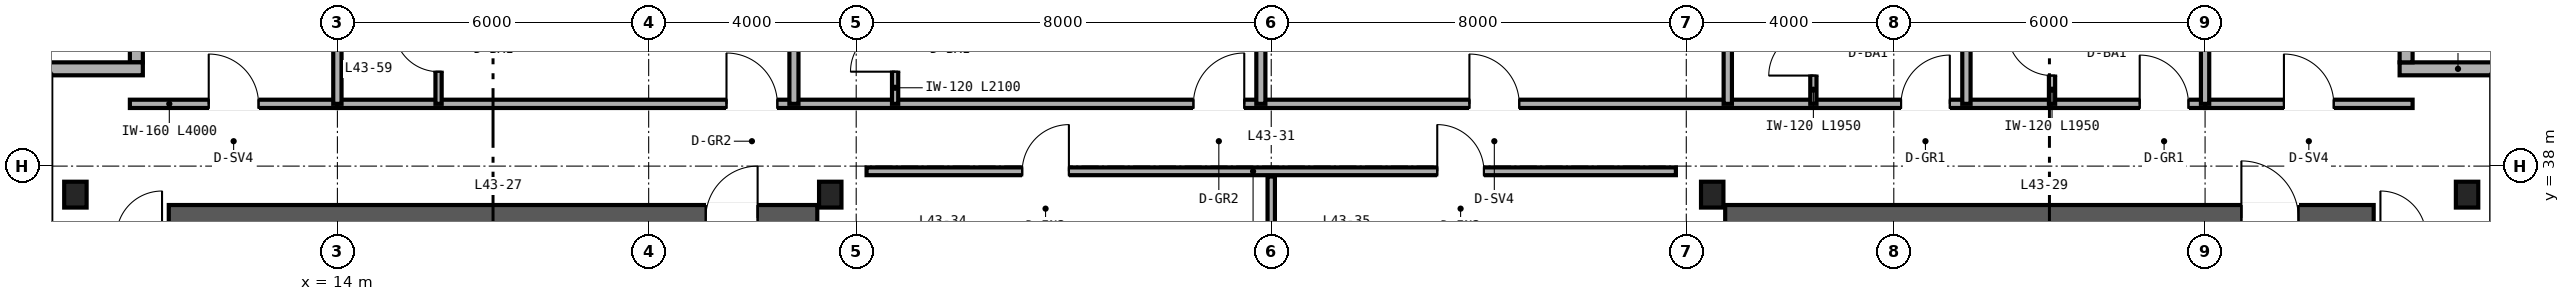
"""IFC4 building model, lengths in metres.
Left out: names, types, materials, properties, quantities, classifications, styles, units other than length and angle.
Written with IfcOpenShell. Run it as: python <this file> out.ifc"""

import sys

from ifc_helpers import new_model, si_unit, direction, frame, frame_2d, origin, origin_2d, place, context, subcontext, project, spatial, rectangle, i_section, extrude, source, transform, mapped, element, fill, save


model = new_model("IFC4")
c1 = context("Model", 3, precision=1e-05, world=origin(), true_north=direction((0.0, 1.0)))
c2 = subcontext(c1, "Body", "Model", "MODEL_VIEW")
j1 = project(units=[si_unit("LENGTHUNIT", "METRE"), si_unit("PLANEANGLEUNIT", "RADIAN")], contexts=[c1])
p1 = place(None, origin())
s1 = spatial("IfcSite", under=j1, at=p1, CompositionType="ELEMENT")
p2 = place(p1, origin())
s2 = spatial("IfcBuilding", under=s1, at=p2, CompositionType="ELEMENT")
p3 = place(p2, frame((0.0, 0.0, 174.0)))
s3 = spatial("IfcBuildingStorey", under=s2, at=p3, CompositionType="ELEMENT", Elevation=174.0)
p4 = place(p3, frame((10.75, 37.0, 0.0), z_axis=(0.0, 0.0, 1.0), x_axis=(1.0, 0.0, 0.0)))
e1 = element("IfcWall", 1, at=p4, inside=s3, PredefinedType="SHEAR", context=c2, shape_type="SweptSolid", body=[
    extrude(rectangle(XDim=12.5, YDim=0.5, at=frame_2d((6.25, 0.0))), origin(), (0.0, 0.0, 1.0), 3.37),
])
p5 = place(p4, frame((10.35, 0.0, 0.0)))
e2 = element("IfcOpeningElement", 2, at=p5, cuts=e1, PredefinedType="OPENING", context=c2, shape_type="SweptSolid", body=[
    extrude(rectangle(XDim=1.0, YDim=2.15, at=frame_2d((0.5, 1.075))), frame((0.0, 0.26, 0.0), z_axis=(0.0, -1.0, 0.0), x_axis=(1.0, 0.0, 0.0)), (0.0, 0.0, 1.0), 0.52),
])
p6 = place(p3, frame((40.75, 37.0, 0.0), z_axis=(0.0, 0.0, 1.0), x_axis=(1.0, 0.0, 0.0)))
e3 = element("IfcWall", 3, at=p6, inside=s3, PredefinedType="SHEAR", context=c2, shape_type="SweptSolid", body=[
    extrude(rectangle(XDim=12.5, YDim=0.5, at=frame_2d((6.25, 0.0))), origin(), (0.0, 0.0, 1.0), 3.37),
])
p7 = place(p6, frame((9.95, 0.0, 0.0)))
e4 = element("IfcOpeningElement", 4, at=p7, cuts=e3, PredefinedType="OPENING", context=c2, shape_type="SweptSolid", body=[
    extrude(rectangle(XDim=1.1, YDim=2.15, at=frame_2d((0.55, 1.075))), frame((0.0, 0.26, 0.0), z_axis=(0.0, -1.0, 0.0), x_axis=(1.0, 0.0, 0.0)), (0.0, 0.0, 1.0), 0.52),
])
m1 = source(origin(), c2, "Body", "SweptSolid", [
    extrude(i_section(OverallWidth=0.432, OverallDepth=0.498, WebThickness=0.056, FlangeThickness=0.089, FilletRadius=0.025, at=origin_2d()), origin(), (0.0, 0.0, 1.0), 3.37),
])
for number, where, z_axis, x_axis in (
    (5, (8.95, 37.45, 0.0), (0.0, 0.0, 1.0), (1.0, 0.0, 0.0)),
    (6, (23.5, 37.45, 0.0), (0.0, 0.0, 1.0), (1.0, 0.0, 0.0)),
    (7, (40.5, 37.45, 0.0), (0.0, 0.0, 1.0), (1.0, 0.0, 0.0)),
    (8, (55.05, 37.45, 0.0), (0.0, 0.0, 1.0), (1.0, 0.0, 0.0)),
):
    element("IfcColumn", number, at=place(p3, frame(where, z_axis=z_axis, x_axis=x_axis)), inside=s3, PredefinedType="COLUMN", context=c2, shape_type="MappedRepresentation", body=[
        mapped(m1, transform((0.0, 0.0, 0.0), scale=1.0)),
    ])
p8 = place(p3, frame((56.0, 39.875, 0.0), z_axis=(0.0, 0.0, 1.0), x_axis=(-1.0, 0.0, 0.0)))
e9 = element("IfcWall", 9, at=p8, inside=s3, PredefinedType="SOLIDWALL", context=c2, shape_type="SweptSolid", body=[
    extrude(rectangle(XDim=2.25, YDim=0.25, at=frame_2d((1.125, 0.0))), origin(), (0.0, 0.0, 1.0), 3.37),
])
for number, where, z_axis, x_axis in (
    (10, (53.875, 40.0, 0.0), (0.0, 0.0, 1.0), (0.0, 1.0, 0.0)),
    (11, (10.125, 42.0, 0.0), (0.0, 0.0, 1.0), (0.0, -1.0, 0.0)),
):
    element("IfcWall", number, at=place(p3, frame(where, z_axis=z_axis, x_axis=x_axis)), inside=s3, PredefinedType="SOLIDWALL", context=c2, shape_type="SweptSolid", body=[
        extrude(rectangle(XDim=2.0, YDim=0.25, at=frame_2d((1.0, 0.0))), origin(), (0.0, 0.0, 1.0), 3.37),
    ])
p9 = place(p3, frame((10.25, 39.875, 0.0), z_axis=(0.0, 0.0, 1.0), x_axis=(-1.0, 0.0, 0.0)))
e12 = element("IfcWall", 12, at=p9, inside=s3, PredefinedType="SOLIDWALL", context=c2, shape_type="SweptSolid", body=[
    extrude(rectangle(XDim=2.25, YDim=0.25, at=frame_2d((1.125, 0.0))), origin(), (0.0, 0.0, 1.0), 3.37),
])
p10 = place(p3, frame((24.2, 37.9, 0.0), z_axis=(0.0, 0.0, 1.0), x_axis=(1.0, 0.0, 0.0)))
e13 = element("IfcWall", 13, at=p10, inside=s3, PredefinedType="PARTITIONING", context=c2, shape_type="SweptSolid", body=[
    extrude(rectangle(XDim=15.6, YDim=0.15, at=frame_2d((7.8, 0.0))), origin(), (0.0, 0.0, 1.0), 3.37),
])
p11 = place(p10, frame((3.0, 0.0, 0.0)))
e14 = element("IfcOpeningElement", 14, at=p11, cuts=e13, PredefinedType="OPENING", context=c2, shape_type="SweptSolid", body=[
    extrude(rectangle(XDim=0.9, YDim=2.15, at=frame_2d((0.45, 1.075))), frame((0.0, 0.085, 0.0), z_axis=(0.0, -1.0, 0.0), x_axis=(1.0, 0.0, 0.0)), (0.0, 0.0, 1.0), 0.17),
])
p12 = place(p10, frame((11.0, 0.0, 0.0)))
e15 = element("IfcOpeningElement", 15, at=p12, cuts=e13, PredefinedType="OPENING", context=c2, shape_type="SweptSolid", body=[
    extrude(rectangle(XDim=0.9, YDim=2.15, at=frame_2d((0.45, 1.075))), frame((0.0, 0.085, 0.0), z_axis=(0.0, -1.0, 0.0), x_axis=(1.0, 0.0, 0.0)), (0.0, 0.0, 1.0), 0.17),
])
p13 = place(p3, frame((32.0, 36.12, 0.0), z_axis=(0.0, 0.0, 1.0), x_axis=(0.0, 1.0, 0.0)))
e16 = element("IfcWall", 16, at=p13, inside=s3, PredefinedType="PARTITIONING", context=c2, shape_type="SweptSolid", body=[
    extrude(rectangle(XDim=1.68, YDim=0.142, at=frame_2d((0.84, 0.0))), origin(), (0.0, 0.0, 1.0), 3.37),
])
p14 = place(p3, frame((10.0, 39.2, 0.0), z_axis=(0.0, 0.0, 1.0), x_axis=(1.0, 0.0, 0.0)))
e17 = element("IfcWall", 17, at=p14, inside=s3, PredefinedType="PARTITIONING", context=c2, shape_type="SweptSolid", body=[
    extrude(rectangle(XDim=4.0, YDim=0.16, at=frame_2d((2.0, 0.0))), origin(), (0.0, 0.0, 1.0), 3.37),
])
p15 = place(p14, frame((1.52, 0.0, 0.0)))
e18 = element("IfcOpeningElement", 18, at=p15, cuts=e17, PredefinedType="OPENING", context=c2, shape_type="SweptSolid", body=[
    extrude(rectangle(XDim=0.96, YDim=2.15, at=frame_2d((0.48, 1.075))), frame((0.0, 0.09, 0.0), z_axis=(0.0, -1.0, 0.0), x_axis=(1.0, 0.0, 0.0)), (0.0, 0.0, 1.0), 0.18),
])
p16 = place(p3, frame((50.0, 39.2, 0.0), z_axis=(0.0, 0.0, 1.0), x_axis=(1.0, 0.0, 0.0)))
e19 = element("IfcWall", 19, at=p16, inside=s3, PredefinedType="PARTITIONING", context=c2, shape_type="SweptSolid", body=[
    extrude(rectangle(XDim=4.0, YDim=0.16, at=frame_2d((2.0, 0.0))), origin(), (0.0, 0.0, 1.0), 3.37),
])
p17 = place(p16, frame((1.52, 0.0, 0.0)))
e20 = element("IfcOpeningElement", 20, at=p17, cuts=e19, PredefinedType="OPENING", context=c2, shape_type="SweptSolid", body=[
    extrude(rectangle(XDim=0.96, YDim=2.15, at=frame_2d((0.48, 1.075))), frame((0.0, 0.09, 0.0), z_axis=(0.0, -1.0, 0.0), x_axis=(1.0, 0.0, 0.0)), (0.0, 0.0, 1.0), 0.18),
])
p18 = place(p3, frame((14.0, 39.2, 0.0), z_axis=(0.0, 0.0, 1.0), x_axis=(1.0, 0.0, 0.0)))
e21 = element("IfcWall", 21, at=p18, inside=s3, PredefinedType="PARTITIONING", context=c2, shape_type="SweptSolid", body=[
    extrude(rectangle(XDim=36.0, YDim=0.16, at=frame_2d((18.0, 0.0))), origin(), (0.0, 0.0, 1.0), 2.913),
])
p19 = place(p18, frame((7.5, 0.0, 0.0)))
e22 = element("IfcOpeningElement", 22, at=p19, cuts=e21, PredefinedType="OPENING", context=c2, shape_type="SweptSolid", body=[
    extrude(rectangle(XDim=0.98, YDim=2.2, at=frame_2d((0.49, 1.1))), frame((0.0, 0.09, 0.0), z_axis=(0.0, -1.0, 0.0), x_axis=(1.0, 0.0, 0.0)), (0.0, 0.0, 1.0), 0.18),
])
p20 = place(p18, frame((16.5, 0.0, 0.0)))
e23 = element("IfcOpeningElement", 23, at=p20, cuts=e21, PredefinedType="OPENING", context=c2, shape_type="SweptSolid", body=[
    extrude(rectangle(XDim=0.98, YDim=2.2, at=frame_2d((0.49, 1.1))), frame((0.0, 0.09, 0.0), z_axis=(0.0, -1.0, 0.0), x_axis=(1.0, 0.0, 0.0)), (0.0, 0.0, 1.0), 0.18),
])
p21 = place(p18, frame((21.82, 0.0, 0.0)))
e24 = element("IfcOpeningElement", 24, at=p21, cuts=e21, PredefinedType="OPENING", context=c2, shape_type="SweptSolid", body=[
    extrude(rectangle(XDim=0.96, YDim=2.15, at=frame_2d((0.48, 1.075))), frame((0.0, 0.09, 0.0), z_axis=(0.0, -1.0, 0.0), x_axis=(1.0, 0.0, 0.0)), (0.0, 0.0, 1.0), 0.18),
])
p22 = place(p18, frame((30.14, 0.0, 0.0)))
e25 = element("IfcOpeningElement", 25, at=p22, cuts=e21, PredefinedType="OPENING", context=c2, shape_type="SweptSolid", body=[
    extrude(rectangle(XDim=0.94, YDim=2.15, at=frame_2d((0.47, 1.075))), frame((0.0, 0.09, 0.0), z_axis=(0.0, -1.0, 0.0), x_axis=(1.0, 0.0, 0.0)), (0.0, 0.0, 1.0), 0.18),
])
p23 = place(p18, frame((34.74, 0.0, 0.0)))
e26 = element("IfcOpeningElement", 26, at=p23, cuts=e21, PredefinedType="OPENING", context=c2, shape_type="SweptSolid", body=[
    extrude(rectangle(XDim=0.94, YDim=2.15, at=frame_2d((0.47, 1.075))), frame((0.0, 0.09, 0.0), z_axis=(0.0, -1.0, 0.0), x_axis=(1.0, 0.0, 0.0)), (0.0, 0.0, 1.0), 0.18),
])
for number, where, z_axis, x_axis in (
    (27, (14.0, 39.2, 0.0), (0.0, 0.0, 1.0), (0.0, 1.0, 0.0)),
    (28, (50.0, 39.2, 0.0), (0.0, 0.0, 1.0), (0.0, 1.0, 0.0)),
):
    element("IfcWall", number, at=place(p3, frame(where, z_axis=z_axis, x_axis=x_axis)), inside=s3, PredefinedType="PARTITIONING", context=c2, shape_type="SweptSolid", body=[
        extrude(rectangle(XDim=6.44, YDim=0.16, at=frame_2d((3.22, 0.0))), origin(), (0.0, 0.0, 1.0), 2.677),
    ])
p24 = place(p3, frame((22.8, 39.2, 0.0), z_axis=(0.0, 0.0, 1.0), x_axis=(0.0, 1.0, 0.0)))
e29 = element("IfcWall", 29, at=p24, inside=s3, PredefinedType="PARTITIONING", context=c2, shape_type="SweptSolid", body=[
    extrude(rectangle(XDim=6.44, YDim=0.175, at=frame_2d((3.22, 0.0))), origin(), (0.0, 0.0, 1.0), 2.833),
])
p25 = place(p3, frame((15.95, 39.2, 0.0), z_axis=(0.0, 0.0, 1.0), x_axis=(0.0, 1.0, 0.0)))
e30 = element("IfcWall", 30, at=p25, inside=s3, PredefinedType="PARTITIONING", context=c2, shape_type="SweptSolid", body=[
    extrude(rectangle(XDim=2.1, YDim=0.12, at=frame_2d((1.05, 0.0))), origin(), (0.0, 0.0, 1.0), 3.37),
])
p26 = place(p25, frame((0.62, 0.0, 0.0)))
e31 = element("IfcOpeningElement", 31, at=p26, cuts=e30, PredefinedType="OPENING", context=c2, shape_type="SweptSolid", body=[
    extrude(rectangle(XDim=0.86, YDim=2.1, at=frame_2d((0.43, 1.05))), frame((0.0, 0.07, 0.0), z_axis=(0.0, -1.0, 0.0), x_axis=(1.0, 0.0, 0.0)), (0.0, 0.0, 1.0), 0.14),
])
p27 = place(p3, frame((31.8, 39.2, 0.0), z_axis=(0.0, 0.0, 1.0), x_axis=(0.0, 1.0, 0.0)))
e32 = element("IfcWall", 32, at=p27, inside=s3, PredefinedType="PARTITIONING", context=c2, shape_type="SweptSolid", body=[
    extrude(rectangle(XDim=6.44, YDim=0.175, at=frame_2d((3.22, 0.0))), origin(), (0.0, 0.0, 1.0), 2.443),
])
p28 = place(p3, frame((24.75, 39.2, 0.0), z_axis=(0.0, 0.0, 1.0), x_axis=(0.0, 1.0, 0.0)))
e33 = element("IfcWall", 33, at=p28, inside=s3, PredefinedType="PARTITIONING", context=c2, shape_type="SweptSolid", body=[
    extrude(rectangle(XDim=2.1, YDim=0.12, at=frame_2d((1.05, 0.0))), origin(), (0.0, 0.0, 1.0), 3.37),
])
p29 = place(p28, frame((0.62, 0.0, 0.0)))
e34 = element("IfcOpeningElement", 34, at=p29, cuts=e33, PredefinedType="OPENING", context=c2, shape_type="SweptSolid", body=[
    extrude(rectangle(XDim=0.86, YDim=2.1, at=frame_2d((0.43, 1.05))), frame((0.0, 0.07, 0.0), z_axis=(0.0, -1.0, 0.0), x_axis=(1.0, 0.0, 0.0)), (0.0, 0.0, 1.0), 0.14),
])
p30 = place(p3, frame((40.8, 39.2, 0.0), z_axis=(0.0, 0.0, 1.0), x_axis=(0.0, 1.0, 0.0)))
e35 = element("IfcWall", 35, at=p30, inside=s3, PredefinedType="PARTITIONING", context=c2, shape_type="SweptSolid", body=[
    extrude(rectangle(XDim=6.44, YDim=0.16, at=frame_2d((3.22, 0.0))), origin(), (0.0, 0.0, 1.0), 2.443),
])
p31 = place(p3, frame((45.4, 39.2, 0.0), z_axis=(0.0, 0.0, 1.0), x_axis=(0.0, 1.0, 0.0)))
e36 = element("IfcWall", 36, at=p31, inside=s3, PredefinedType="PARTITIONING", context=c2, shape_type="SweptSolid", body=[
    extrude(rectangle(XDim=6.44, YDim=0.16, at=frame_2d((3.22, 0.0))), origin(), (0.0, 0.0, 1.0), 2.677),
])
p32 = place(p3, frame((42.45, 39.2, 0.0), z_axis=(0.0, 0.0, 1.0), x_axis=(0.0, 1.0, 0.0)))
e37 = element("IfcWall", 37, at=p32, inside=s3, PredefinedType="PARTITIONING", context=c2, shape_type="SweptSolid", body=[
    extrude(rectangle(XDim=1.95, YDim=0.12, at=frame_2d((0.975, 0.0))), origin(), (0.0, 0.0, 1.0), 3.37),
])
p33 = place(p32, frame((0.545, 0.0, 0.0)))
e38 = element("IfcOpeningElement", 38, at=p33, cuts=e37, PredefinedType="OPENING", context=c2, shape_type="SweptSolid", body=[
    extrude(rectangle(XDim=0.86, YDim=2.1, at=frame_2d((0.43, 1.05))), frame((0.0, 0.07, 0.0), z_axis=(0.0, -1.0, 0.0), x_axis=(1.0, 0.0, 0.0)), (0.0, 0.0, 1.0), 0.14),
])
p34 = place(p3, frame((47.05, 39.2, 0.0), z_axis=(0.0, 0.0, 1.0), x_axis=(0.0, 1.0, 0.0)))
e39 = element("IfcWall", 39, at=p34, inside=s3, PredefinedType="PARTITIONING", context=c2, shape_type="SweptSolid", body=[
    extrude(rectangle(XDim=1.95, YDim=0.12, at=frame_2d((0.975, 0.0))), origin(), (0.0, 0.0, 1.0), 3.37),
])
p35 = place(p34, frame((0.545, 0.0, 0.0)))
e40 = element("IfcOpeningElement", 40, at=p35, cuts=e39, PredefinedType="OPENING", context=c2, shape_type="SweptSolid", body=[
    extrude(rectangle(XDim=0.86, YDim=2.1, at=frame_2d((0.43, 1.05))), frame((0.0, 0.07, 0.0), z_axis=(0.0, -1.0, 0.0), x_axis=(1.0, 0.0, 0.0)), (0.0, 0.0, 1.0), 0.14),
])
m2 = source(origin(), c2, "Body", "SweptSolid", [
    extrude(rectangle(XDim=1.0, YDim=2.15, at=frame_2d((0.5, 1.075))), frame((0.0, 0.025, 0.0), z_axis=(0.0, -1.0, 0.0), x_axis=(1.0, 0.0, 0.0)), (0.0, 0.0, 1.0), 0.05),
])
p36 = place(p5, origin())
e41 = element("IfcDoor", 41, at=p36, inside=s3, OperationType="SINGLE_SWING_RIGHT", PredefinedType="DOOR", context=c2, shape_type="MappedRepresentation", body=[
    mapped(m2, transform((0.0, 0.0, 0.0), scale=1.0)),
])
fill(e2, e41)
m3 = source(origin(), c2, "Body", "SweptSolid", [
    extrude(rectangle(XDim=1.1, YDim=2.15, at=frame_2d((0.55, 1.075))), frame((0.0, 0.025, 0.0), z_axis=(0.0, -1.0, 0.0), x_axis=(1.0, 0.0, 0.0)), (0.0, 0.0, 1.0), 0.05),
])
p37 = place(p7, origin())
e42 = element("IfcDoor", 42, at=p37, inside=s3, OperationType="SINGLE_SWING_LEFT", PredefinedType="DOOR", context=c2, shape_type="MappedRepresentation", body=[
    mapped(m3, transform((0.0, 0.0, 0.0), scale=1.0)),
])
fill(e4, e42)
m4 = source(origin(), c2, "Body", "SweptSolid", [
    extrude(rectangle(XDim=0.9, YDim=2.15, at=frame_2d((0.45, 1.075))), frame((0.0, 0.025, 0.0), z_axis=(0.0, -1.0, 0.0), x_axis=(1.0, 0.0, 0.0)), (0.0, 0.0, 1.0), 0.05),
])
p38 = place(p11, origin())
e43 = element("IfcDoor", 43, at=p38, inside=s3, OperationType="SINGLE_SWING_RIGHT", PredefinedType="DOOR", context=c2, shape_type="MappedRepresentation", body=[
    mapped(m4, transform((0.0, 0.0, 0.0), scale=1.0)),
])
fill(e14, e43)
p39 = place(p12, origin())
e44 = element("IfcDoor", 44, at=p39, inside=s3, OperationType="SINGLE_SWING_LEFT", PredefinedType="DOOR", context=c2, shape_type="MappedRepresentation", body=[
    mapped(m4, transform((0.0, 0.0, 0.0), scale=1.0)),
])
fill(e15, e44)
m5 = source(origin(), c2, "Body", "SweptSolid", [
    extrude(rectangle(XDim=0.96, YDim=2.15, at=frame_2d((0.48, 1.075))), frame((0.0, 0.025, 0.0), z_axis=(0.0, -1.0, 0.0), x_axis=(1.0, 0.0, 0.0)), (0.0, 0.0, 1.0), 0.05),
])
p40 = place(p15, origin())
e45 = element("IfcDoor", 45, at=p40, inside=s3, OperationType="SINGLE_SWING_LEFT", PredefinedType="DOOR", context=c2, shape_type="MappedRepresentation", body=[
    mapped(m5, transform((0.0, 0.0, 0.0), scale=1.0)),
])
fill(e18, e45)
p41 = place(p17, origin())
e46 = element("IfcDoor", 46, at=p41, inside=s3, OperationType="SINGLE_SWING_LEFT", PredefinedType="DOOR", context=c2, shape_type="MappedRepresentation", body=[
    mapped(m5, transform((0.0, 0.0, 0.0), scale=1.0)),
])
fill(e20, e46)
m6 = source(origin(), c2, "Body", "SweptSolid", [
    extrude(rectangle(XDim=0.86, YDim=2.1, at=frame_2d((0.43, 1.05))), frame((0.0, 0.025, 0.0), z_axis=(0.0, -1.0, 0.0), x_axis=(1.0, 0.0, 0.0)), (0.0, 0.0, 1.0), 0.05),
])
p42 = place(p26, origin())
e47 = element("IfcDoor", 47, at=p42, inside=s3, OperationType="SINGLE_SWING_RIGHT", PredefinedType="DOOR", context=c2, shape_type="MappedRepresentation", body=[
    mapped(m6, transform((0.0, 0.0, 0.0), scale=1.0)),
])
fill(e31, e47)
p43 = place(p29, origin())
e48 = element("IfcDoor", 48, at=p43, inside=s3, OperationType="SINGLE_SWING_LEFT", PredefinedType="DOOR", context=c2, shape_type="MappedRepresentation", body=[
    mapped(m6, transform((0.0, 0.0, 0.0), scale=1.0)),
])
fill(e34, e48)
p44 = place(p33, origin())
e49 = element("IfcDoor", 49, at=p44, inside=s3, OperationType="SINGLE_SWING_LEFT", PredefinedType="DOOR", context=c2, shape_type="MappedRepresentation", body=[
    mapped(m6, transform((0.0, 0.0, 0.0), scale=1.0)),
])
fill(e38, e49)
p45 = place(p35, origin())
e50 = element("IfcDoor", 50, at=p45, inside=s3, OperationType="SINGLE_SWING_RIGHT", PredefinedType="DOOR", context=c2, shape_type="MappedRepresentation", body=[
    mapped(m6, transform((0.0, 0.0, 0.0), scale=1.0)),
])
fill(e40, e50)
m7 = source(origin(), c2, "Body", "SweptSolid", [
    extrude(rectangle(XDim=0.98, YDim=2.2, at=frame_2d((0.49, 1.1))), frame((0.0, 0.025, 0.0), z_axis=(0.0, -1.0, 0.0), x_axis=(1.0, 0.0, 0.0)), (0.0, 0.0, 1.0), 0.05),
])
p46 = place(p19, origin())
e51 = element("IfcDoor", 51, at=p46, inside=s3, OperationType="SINGLE_SWING_LEFT", PredefinedType="DOOR", context=c2, shape_type="MappedRepresentation", body=[
    mapped(m7, transform((0.0, 0.0, 0.0), scale=1.0)),
])
fill(e22, e51)
p47 = place(p20, origin())
e52 = element("IfcDoor", 52, at=p47, inside=s3, OperationType="SINGLE_SWING_RIGHT", PredefinedType="DOOR", context=c2, shape_type="MappedRepresentation", body=[
    mapped(m7, transform((0.0, 0.0, 0.0), scale=1.0)),
])
fill(e23, e52)
p48 = place(p21, origin())
e53 = element("IfcDoor", 53, at=p48, inside=s3, OperationType="SINGLE_SWING_LEFT", PredefinedType="DOOR", context=c2, shape_type="MappedRepresentation", body=[
    mapped(m5, transform((0.0, 0.0, 0.0), scale=1.0)),
])
fill(e24, e53)
m8 = source(origin(), c2, "Body", "SweptSolid", [
    extrude(rectangle(XDim=0.94, YDim=2.15, at=frame_2d((0.47, 1.075))), frame((0.0, 0.025, 0.0), z_axis=(0.0, -1.0, 0.0), x_axis=(1.0, 0.0, 0.0)), (0.0, 0.0, 1.0), 0.05),
])
p49 = place(p22, origin())
e54 = element("IfcDoor", 54, at=p49, inside=s3, OperationType="SINGLE_SWING_RIGHT", PredefinedType="DOOR", context=c2, shape_type="MappedRepresentation", body=[
    mapped(m8, transform((0.0, 0.0, 0.0), scale=1.0)),
])
fill(e25, e54)
p50 = place(p23, origin())
e55 = element("IfcDoor", 55, at=p50, inside=s3, OperationType="SINGLE_SWING_LEFT", PredefinedType="DOOR", context=c2, shape_type="MappedRepresentation", body=[
    mapped(m8, transform((0.0, 0.0, 0.0), scale=1.0)),
])
fill(e26, e55)
save(model, sys.argv[1])
